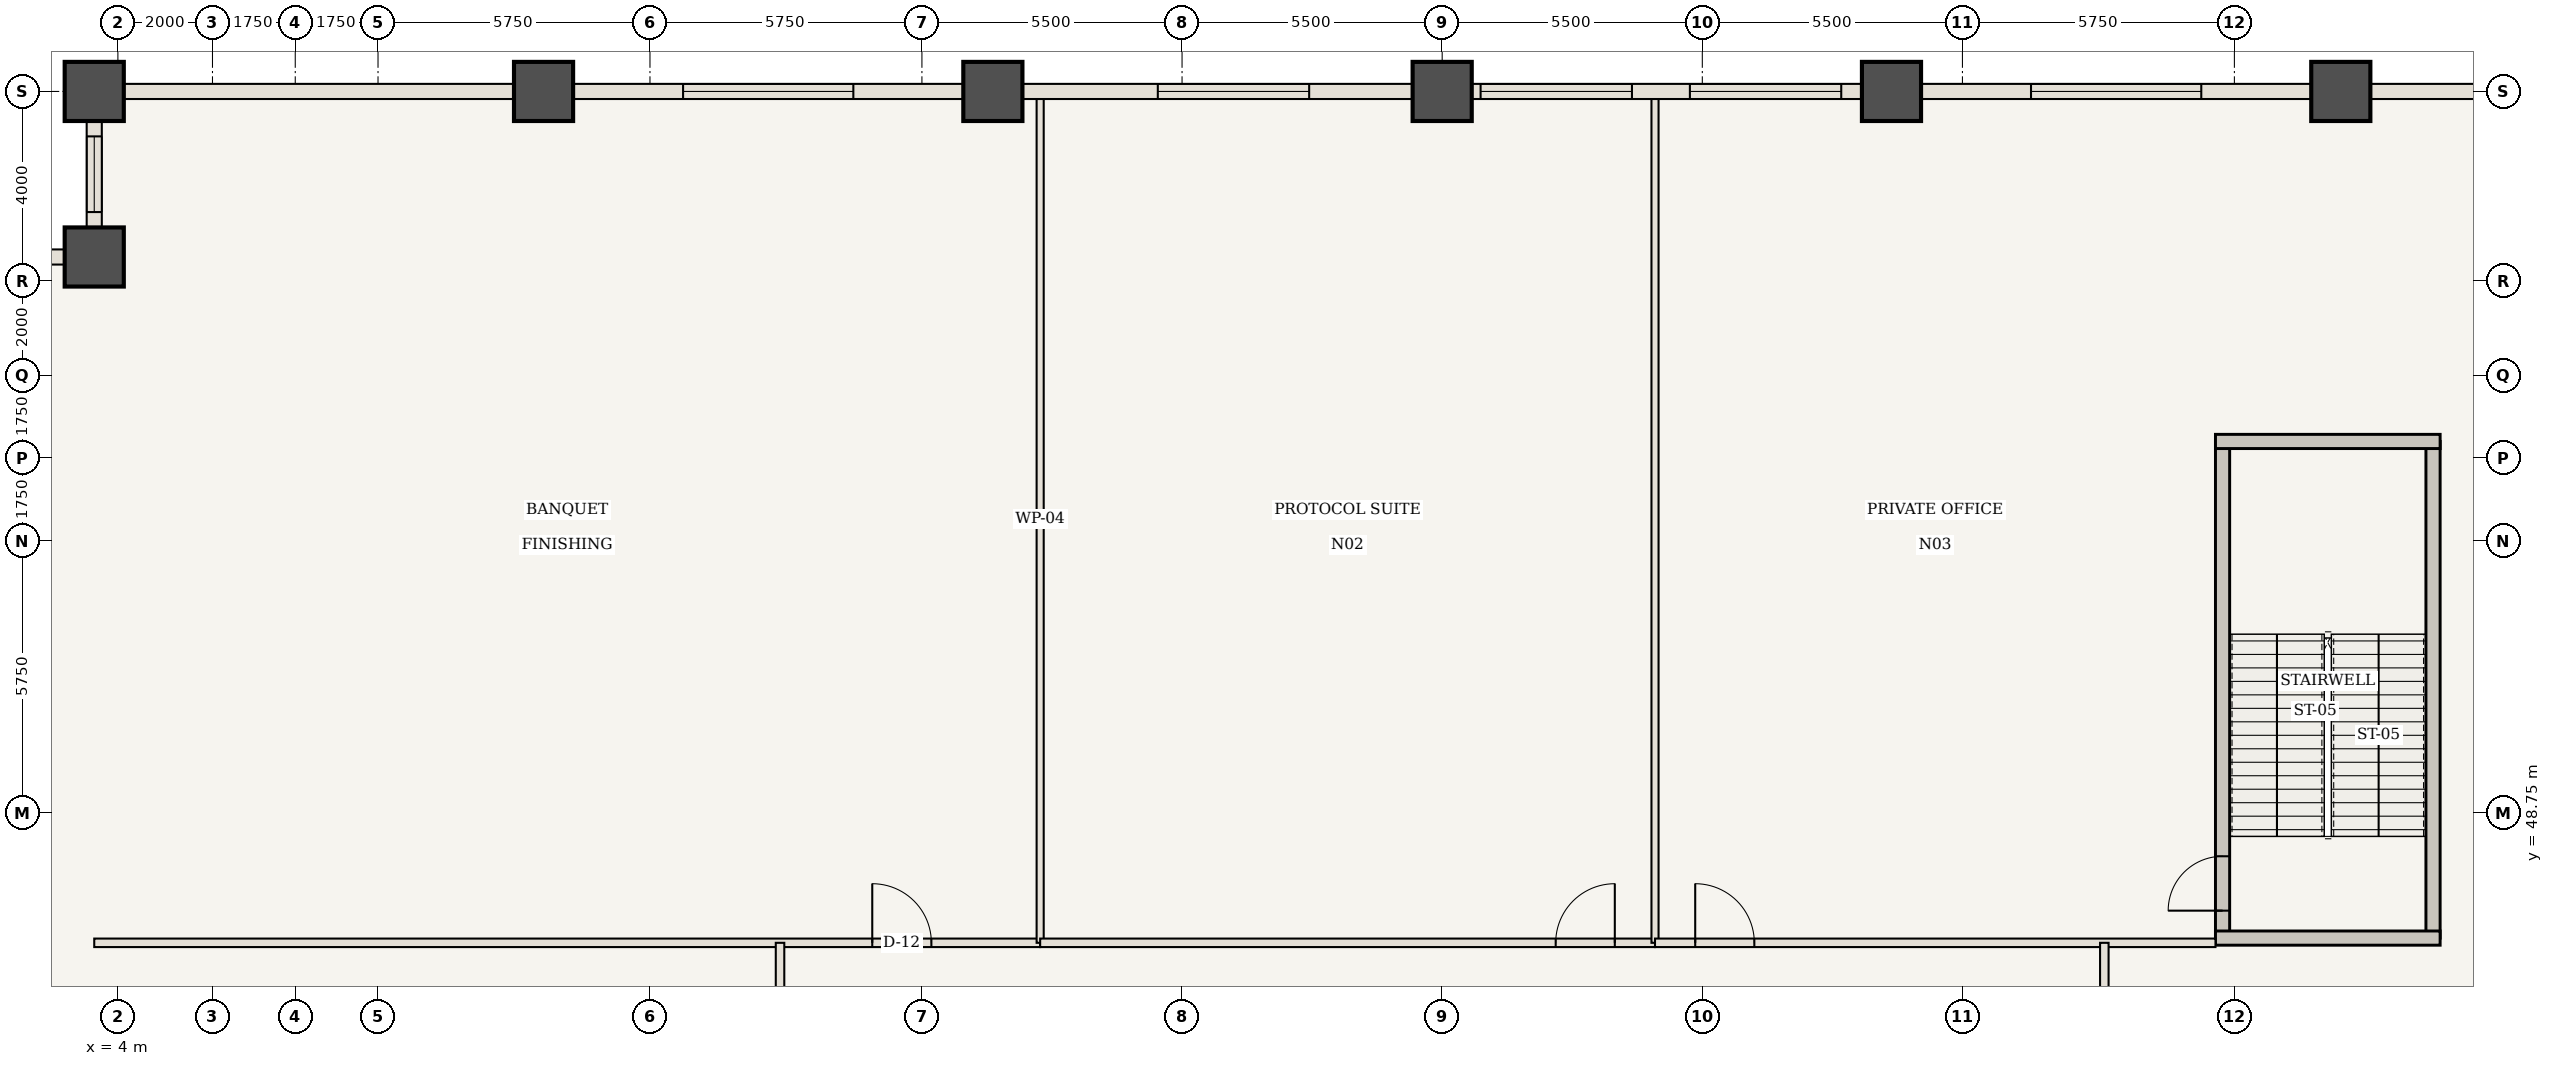
"""IFC4 building model, lengths in metres.
Left out: names, types, materials, properties, quantities, classifications, styles, units other than length and angle.
Written with IfcOpenShell. Run it as: python <this file> out.ifc"""

import sys

from ifc_helpers import new_model, si_unit, direction, frame, frame_2d, origin, origin_2d, place, context, subcontext, project, spatial, rectangle, extrude, element, fill, save


model = new_model("IFC4")
c1 = context("Model", 3, precision=1e-05, world=origin(), true_north=direction((0.0, 1.0)))
c2 = subcontext(c1, "Body", "Model", "MODEL_VIEW")
j1 = project(units=[si_unit("LENGTHUNIT", "METRE"), si_unit("PLANEANGLEUNIT", "RADIAN")], contexts=[c1])
p1 = place(None, origin())
s1 = spatial("IfcSite", under=j1, at=p1, CompositionType="ELEMENT")
p2 = place(p1, origin())
s2 = spatial("IfcBuilding", under=s1, at=p2, CompositionType="ELEMENT")
p3 = place(p2, frame((0.0, 0.0, 23.8)))
s3 = spatial("IfcBuildingStorey", under=s2, at=p3, CompositionType="ELEMENT", Elevation=23.8)
for number, where, z_axis, x_axis in (
    (1, (3.5, 64.0, 0.0), (0.0, 0.0, 1.0), (1.0, 0.0, 0.0)),
    (2, (3.5, 60.5, 0.0), (0.0, 0.0, 1.0), (1.0, 0.0, 0.0)),
    (3, (13.0, 64.0, 0.0), (0.0, 0.0, 1.0), (1.0, 0.0, 0.0)),
    (4, (22.5, 64.0, 0.0), (0.0, 0.0, 1.0), (1.0, 0.0, 0.0)),
    (5, (32.0, 64.0, 0.0), (0.0, 0.0, 1.0), (1.0, 0.0, 0.0)),
    (6, (41.5, 64.0, 0.0), (0.0, 0.0, 1.0), (1.0, 0.0, 0.0)),
    (7, (51.0, 64.0, 0.0), (0.0, 0.0, 1.0), (1.0, 0.0, 0.0)),
):
    element("IfcColumn", number, at=place(p3, frame(where, z_axis=z_axis, x_axis=x_axis)), inside=s3, PredefinedType="COLUMN", context=c2, shape_type="SweptSolid", body=[
        extrude(rectangle(XDim=1.25, YDim=1.25, at=origin_2d()), origin(), (0.0, 0.0, 1.0), 5.6),
    ])
p4 = place(p3, frame((48.5, 46.1, 0.0), z_axis=(0.0, 0.0, 1.0), x_axis=(0.0, 1.0, 0.0)))
e8 = element("IfcWall", 8, at=p4, inside=s3, PredefinedType="SHEAR", context=c2, shape_type="SweptSolid", body=[
    extrude(rectangle(XDim=10.5, YDim=0.3, at=frame_2d((5.25, 0.0))), origin(), (0.0, 0.0, 1.0), 5.18),
])
p5 = place(p4, frame((0.58, 0.0, 0.0)))
e9 = element("IfcOpeningElement", 9, at=p5, cuts=e8, PredefinedType="OPENING", context=c2, shape_type="SweptSolid", body=[
    extrude(rectangle(XDim=1.15, YDim=2.15, at=frame_2d((0.575, 1.075))), frame((0.0, 0.16, 0.0), z_axis=(0.0, -1.0, 0.0), x_axis=(1.0, 0.0, 0.0)), (0.0, 0.0, 1.0), 0.32),
])
p6 = place(p3, frame((52.95, 46.1, 0.0), z_axis=(0.0, 0.0, 1.0), x_axis=(0.0, 1.0, 0.0)))
e10 = element("IfcWall", 10, at=p6, inside=s3, PredefinedType="SHEAR", context=c2, shape_type="SweptSolid", body=[
    extrude(rectangle(XDim=10.5, YDim=0.3, at=frame_2d((5.25, 0.0))), origin(), (0.0, 0.0, 1.0), 5.18),
])
for number, where, z_axis, x_axis in (
    (11, (48.35, 46.1, 0.0), (0.0, 0.0, 1.0), (1.0, 0.0, 0.0)),
    (12, (48.35, 56.6, 0.0), (0.0, 0.0, 1.0), (1.0, 0.0, 0.0)),
):
    element("IfcWall", number, at=place(p3, frame(where, z_axis=z_axis, x_axis=x_axis)), inside=s3, PredefinedType="SHEAR", context=c2, shape_type="SweptSolid", body=[
        extrude(rectangle(XDim=4.75, YDim=0.3, at=frame_2d((2.375, 0.0))), origin(), (0.0, 0.0, 1.0), 5.18),
    ])
p7 = place(p3, frame((3.5, 46.0, 0.0), z_axis=(0.0, 0.0, 1.0), x_axis=(1.0, 0.0, 0.0)))
e13 = element("IfcWall", 13, at=p7, inside=s3, PredefinedType="STANDARD", context=c2, shape_type="SweptSolid", body=[
    extrude(rectangle(XDim=20.0, YDim=0.18, at=frame_2d((10.0, 0.0))), origin(), (0.0, 0.0, 1.0), 5.18),
])
p8 = place(p7, frame((16.45, 0.0, 0.0)))
e14 = element("IfcOpeningElement", 14, at=p8, cuts=e13, PredefinedType="OPENING", context=c2, shape_type="SweptSolid", body=[
    extrude(rectangle(XDim=1.25, YDim=2.2, at=frame_2d((0.625, 1.1))), frame((0.0, 0.1, 0.0), z_axis=(0.0, -1.0, 0.0), x_axis=(1.0, 0.0, 0.0)), (0.0, 0.0, 1.0), 0.2),
])
p9 = place(p3, frame((23.5, 46.0, 0.0), z_axis=(0.0, 0.0, 1.0), x_axis=(0.0, 1.0, 0.0)))
e15 = element("IfcWall", 15, at=p9, inside=s3, PredefinedType="STANDARD", context=c2, shape_type="SweptSolid", body=[
    extrude(rectangle(XDim=17.94, YDim=0.15, at=frame_2d((8.97, 0.0))), origin(), (0.0, 0.0, 1.0), 5.18),
])
p10 = place(p3, frame((23.5, 46.0, 0.0), z_axis=(0.0, 0.0, 1.0), x_axis=(1.0, 0.0, 0.0)))
e16 = element("IfcWall", 16, at=p10, inside=s3, PredefinedType="STANDARD", context=c2, shape_type="SweptSolid", body=[
    extrude(rectangle(XDim=13.0, YDim=0.18, at=frame_2d((6.5, 0.0))), origin(), (0.0, 0.0, 1.0), 5.18),
])
p11 = place(p10, frame((10.9, 0.0, 0.0)))
e17 = element("IfcOpeningElement", 17, at=p11, cuts=e16, PredefinedType="OPENING", context=c2, shape_type="SweptSolid", body=[
    extrude(rectangle(XDim=1.25, YDim=2.2, at=frame_2d((0.625, 1.1))), frame((0.0, 0.1, 0.0), z_axis=(0.0, -1.0, 0.0), x_axis=(1.0, 0.0, 0.0)), (0.0, 0.0, 1.0), 0.2),
])
p12 = place(p3, frame((36.5, 46.0, 0.0), z_axis=(0.0, 0.0, 1.0), x_axis=(0.0, 1.0, 0.0)))
e18 = element("IfcWall", 18, at=p12, inside=s3, PredefinedType="STANDARD", context=c2, shape_type="SweptSolid", body=[
    extrude(rectangle(XDim=17.94, YDim=0.15, at=frame_2d((8.97, 0.0))), origin(), (0.0, 0.0, 1.0), 5.18),
])
p13 = place(p3, frame((36.5, 46.0, 0.0), z_axis=(0.0, 0.0, 1.0), x_axis=(1.0, 0.0, 0.0)))
e19 = element("IfcWall", 19, at=p13, inside=s3, PredefinedType="STANDARD", context=c2, shape_type="SweptSolid", body=[
    extrude(rectangle(XDim=11.85, YDim=0.18, at=frame_2d((5.925, 0.0))), origin(), (0.0, 0.0, 1.0), 5.18),
])
p14 = place(p13, frame((0.85, 0.0, 0.0)))
e20 = element("IfcOpeningElement", 20, at=p14, cuts=e19, PredefinedType="OPENING", context=c2, shape_type="SweptSolid", body=[
    extrude(rectangle(XDim=1.25, YDim=2.2, at=frame_2d((0.625, 1.1))), frame((0.0, 0.1, 0.0), z_axis=(0.0, -1.0, 0.0), x_axis=(1.0, 0.0, 0.0)), (0.0, 0.0, 1.0), 0.2),
])
p15 = place(p3, frame((18.0, 31.2, 0.0), z_axis=(0.0, 0.0, 1.0), x_axis=(0.0, 1.0, 0.0)))
e21 = element("IfcWall", 21, at=p15, inside=s3, PredefinedType="STANDARD", context=c2, shape_type="SweptSolid", body=[
    extrude(rectangle(XDim=14.8, YDim=0.18, at=frame_2d((7.4, 0.0))), origin(), (0.0, 0.0, 1.0), 5.18),
])
p16 = place(p15, frame((6.9, 0.0, 0.0)))
e22 = element("IfcOpeningElement", 22, at=p16, cuts=e21, PredefinedType="OPENING", context=c2, shape_type="SweptSolid", body=[
    extrude(rectangle(XDim=0.95, YDim=2.15, at=frame_2d((0.475, 1.075))), frame((0.0, 0.1, 0.0), z_axis=(0.0, -1.0, 0.0), x_axis=(1.0, 0.0, 0.0)), (0.0, 0.0, 1.0), 0.2),
])
p17 = place(p3, frame((46.0, 32.8, 0.0), z_axis=(0.0, 0.0, 1.0), x_axis=(0.0, 1.0, 0.0)))
e23 = element("IfcWall", 23, at=p17, inside=s3, PredefinedType="STANDARD", context=c2, shape_type="SweptSolid", body=[
    extrude(rectangle(XDim=13.2, YDim=0.18, at=frame_2d((6.6, 0.0))), origin(), (0.0, 0.0, 1.0), 5.18),
])
p18 = place(p17, frame((6.1, 0.0, 0.0)))
e24 = element("IfcOpeningElement", 24, at=p18, cuts=e23, PredefinedType="OPENING", context=c2, shape_type="SweptSolid", body=[
    extrude(rectangle(XDim=0.95, YDim=2.15, at=frame_2d((0.475, 1.075))), frame((0.0, 0.1, 0.0), z_axis=(0.0, -1.0, 0.0), x_axis=(1.0, 0.0, 0.0)), (0.0, 0.0, 1.0), 0.2),
])
p19 = place(p3, frame((3.5, 64.0, 0.0), z_axis=(0.0, 0.0, 1.0), x_axis=(1.0, 0.0, 0.0)))
e25 = element("IfcWall", 25, at=p19, inside=s3, PredefinedType="USERDEFINED", context=c2, shape_type="SweptSolid", body=[
    extrude(rectangle(XDim=9.5, YDim=0.32, at=frame_2d((4.75, 0.0))), origin(), (0.0, 0.0, 1.0), 4.28),
])
p20 = place(p3, frame((13.0, 64.0, 0.0), z_axis=(0.0, 0.0, 1.0), x_axis=(1.0, 0.0, 0.0)))
e26 = element("IfcWall", 26, at=p20, inside=s3, PredefinedType="USERDEFINED", context=c2, shape_type="SweptSolid", body=[
    extrude(rectangle(XDim=9.5, YDim=0.32, at=frame_2d((4.75, 0.0))), origin(), (0.0, 0.0, 1.0), 4.28),
])
p21 = place(p20, frame((2.95, 0.0, 0.85)))
e27 = element("IfcOpeningElement", 27, at=p21, cuts=e26, PredefinedType="OPENING", context=c2, shape_type="SweptSolid", body=[
    extrude(rectangle(XDim=3.6, YDim=2.6, at=frame_2d((1.8, 1.3))), frame((0.0, 0.17, 0.0), z_axis=(0.0, -1.0, 0.0), x_axis=(1.0, 0.0, 0.0)), (0.0, 0.0, 1.0), 0.34),
])
p22 = place(p3, frame((22.5, 64.0, 0.0), z_axis=(0.0, 0.0, 1.0), x_axis=(1.0, 0.0, 0.0)))
e28 = element("IfcWall", 28, at=p22, inside=s3, PredefinedType="USERDEFINED", context=c2, shape_type="SweptSolid", body=[
    extrude(rectangle(XDim=9.5, YDim=0.32, at=frame_2d((4.75, 0.0))), origin(), (0.0, 0.0, 1.0), 4.28),
])
p23 = place(p22, frame((3.488, 0.0, 0.85)))
e29 = element("IfcOpeningElement", 29, at=p23, cuts=e28, PredefinedType="OPENING", context=c2, shape_type="SweptSolid", body=[
    extrude(rectangle(XDim=3.2, YDim=2.4, at=frame_2d((1.6, 1.2))), frame((0.0, 0.17, 0.0), z_axis=(0.0, -1.0, 0.0), x_axis=(1.0, 0.0, 0.0)), (0.0, 0.0, 1.0), 0.34),
])
p24 = place(p3, frame((32.0, 64.0, 0.0), z_axis=(0.0, 0.0, 1.0), x_axis=(1.0, 0.0, 0.0)))
e30 = element("IfcWall", 30, at=p24, inside=s3, PredefinedType="USERDEFINED", context=c2, shape_type="SweptSolid", body=[
    extrude(rectangle(XDim=9.5, YDim=0.32, at=frame_2d((4.75, 0.0))), origin(), (0.0, 0.0, 1.0), 4.28),
])
p25 = place(p24, frame((0.812, 0.0, 0.85)))
e31 = element("IfcOpeningElement", 31, at=p25, cuts=e30, PredefinedType="OPENING", context=c2, shape_type="SweptSolid", body=[
    extrude(rectangle(XDim=3.2, YDim=2.4, at=frame_2d((1.6, 1.2))), frame((0.0, 0.17, 0.0), z_axis=(0.0, -1.0, 0.0), x_axis=(1.0, 0.0, 0.0)), (0.0, 0.0, 1.0), 0.34),
])
p26 = place(p24, frame((5.238, 0.0, 0.85)))
e32 = element("IfcOpeningElement", 32, at=p26, cuts=e30, PredefinedType="OPENING", context=c2, shape_type="SweptSolid", body=[
    extrude(rectangle(XDim=3.2, YDim=2.4, at=frame_2d((1.6, 1.2))), frame((0.0, 0.17, 0.0), z_axis=(0.0, -1.0, 0.0), x_axis=(1.0, 0.0, 0.0)), (0.0, 0.0, 1.0), 0.34),
])
p27 = place(p3, frame((41.5, 64.0, 0.0), z_axis=(0.0, 0.0, 1.0), x_axis=(1.0, 0.0, 0.0)))
e33 = element("IfcWall", 33, at=p27, inside=s3, PredefinedType="USERDEFINED", context=c2, shape_type="SweptSolid", body=[
    extrude(rectangle(XDim=9.5, YDim=0.32, at=frame_2d((4.75, 0.0))), origin(), (0.0, 0.0, 1.0), 4.28),
])
p28 = place(p27, frame((2.95, 0.0, 0.85)))
e34 = element("IfcOpeningElement", 34, at=p28, cuts=e33, PredefinedType="OPENING", context=c2, shape_type="SweptSolid", body=[
    extrude(rectangle(XDim=3.6, YDim=2.6, at=frame_2d((1.8, 1.3))), frame((0.0, 0.17, 0.0), z_axis=(0.0, -1.0, 0.0), x_axis=(1.0, 0.0, 0.0)), (0.0, 0.0, 1.0), 0.34),
])
p29 = place(p3, frame((51.0, 64.0, 0.0), z_axis=(0.0, 0.0, 1.0), x_axis=(1.0, 0.0, 0.0)))
e35 = element("IfcWall", 35, at=p29, inside=s3, PredefinedType="USERDEFINED", context=c2, shape_type="SweptSolid", body=[
    extrude(rectangle(XDim=9.5, YDim=0.32, at=frame_2d((4.75, 0.0))), origin(), (0.0, 0.0, 1.0), 4.28),
])
p30 = place(p3, frame((3.5, 60.5, 0.0), z_axis=(0.0, 0.0, 1.0), x_axis=(0.0, 1.0, 0.0)))
e36 = element("IfcWall", 36, at=p30, inside=s3, PredefinedType="USERDEFINED", context=c2, shape_type="SweptSolid", body=[
    extrude(rectangle(XDim=3.5, YDim=0.32, at=frame_2d((1.75, 0.0))), origin(), (0.0, 0.0, 1.0), 4.28),
])
p31 = place(p30, frame((0.95, 0.0, 0.85)))
e37 = element("IfcOpeningElement", 37, at=p31, cuts=e36, PredefinedType="OPENING", context=c2, shape_type="SweptSolid", body=[
    extrude(rectangle(XDim=1.6, YDim=2.05, at=frame_2d((0.8, 1.025))), frame((0.0, 0.17, 0.0), z_axis=(0.0, -1.0, 0.0), x_axis=(1.0, 0.0, 0.0)), (0.0, 0.0, 1.0), 0.34),
])
p32 = place(p3, frame((0.0, 60.5, 0.0), z_axis=(0.0, 0.0, 1.0), x_axis=(1.0, 0.0, 0.0)))
e38 = element("IfcWall", 38, at=p32, inside=s3, PredefinedType="USERDEFINED", context=c2, shape_type="SweptSolid", body=[
    extrude(rectangle(XDim=3.5, YDim=0.32, at=frame_2d((1.75, 0.0))), origin(), (0.0, 0.0, 1.0), 4.28),
])
p33 = place(p32, frame((0.95, 0.0, 0.85)))
e39 = element("IfcOpeningElement", 39, at=p33, cuts=e38, PredefinedType="OPENING", context=c2, shape_type="SweptSolid", body=[
    extrude(rectangle(XDim=1.6, YDim=2.05, at=frame_2d((0.8, 1.025))), frame((0.0, 0.17, 0.0), z_axis=(0.0, -1.0, 0.0), x_axis=(1.0, 0.0, 0.0)), (0.0, 0.0, 1.0), 0.34),
])
p34 = place(p5, origin())
e40 = element("IfcDoor", 40, at=p34, inside=s3, OperationType="SINGLE_SWING_LEFT", PredefinedType="DOOR", context=c2, shape_type="SweptSolid", body=[
    extrude(rectangle(XDim=1.15, YDim=2.15, at=frame_2d((0.575, 1.075))), frame((0.0, 0.025, 0.0), z_axis=(0.0, -1.0, 0.0), x_axis=(1.0, 0.0, 0.0)), (0.0, 0.0, 1.0), 0.05),
])
fill(e9, e40)
p35 = place(p8, origin())
e41 = element("IfcDoor", 41, at=p35, inside=s3, OperationType="SINGLE_SWING_LEFT", PredefinedType="DOOR", context=c2, shape_type="SweptSolid", body=[
    extrude(rectangle(XDim=1.25, YDim=2.2, at=frame_2d((0.625, 1.1))), frame((0.0, 0.025, 0.0), z_axis=(0.0, -1.0, 0.0), x_axis=(1.0, 0.0, 0.0)), (0.0, 0.0, 1.0), 0.05),
])
fill(e14, e41)
p36 = place(p11, origin())
e42 = element("IfcDoor", 42, at=p36, inside=s3, OperationType="SINGLE_SWING_RIGHT", PredefinedType="DOOR", context=c2, shape_type="SweptSolid", body=[
    extrude(rectangle(XDim=1.25, YDim=2.2, at=frame_2d((0.625, 1.1))), frame((0.0, 0.025, 0.0), z_axis=(0.0, -1.0, 0.0), x_axis=(1.0, 0.0, 0.0)), (0.0, 0.0, 1.0), 0.05),
])
fill(e17, e42)
p37 = place(p14, origin())
e43 = element("IfcDoor", 43, at=p37, inside=s3, OperationType="SINGLE_SWING_LEFT", PredefinedType="DOOR", context=c2, shape_type="SweptSolid", body=[
    extrude(rectangle(XDim=1.25, YDim=2.2, at=frame_2d((0.625, 1.1))), frame((0.0, 0.025, 0.0), z_axis=(0.0, -1.0, 0.0), x_axis=(1.0, 0.0, 0.0)), (0.0, 0.0, 1.0), 0.05),
])
fill(e20, e43)
p38 = place(p21, origin())
e44 = element("IfcWindow", 44, at=p38, inside=s3, PartitioningType="SINGLE_PANEL", PredefinedType="WINDOW", context=c2, shape_type="SweptSolid", body=[
    extrude(rectangle(XDim=3.6, YDim=2.6, at=frame_2d((1.8, 1.3))), frame((0.0, 0.03, 0.0), z_axis=(0.0, -1.0, 0.0), x_axis=(1.0, 0.0, 0.0)), (0.0, 0.0, 1.0), 0.06),
])
fill(e27, e44)
p39 = place(p23, origin())
e45 = element("IfcWindow", 45, at=p39, inside=s3, PartitioningType="SINGLE_PANEL", PredefinedType="WINDOW", context=c2, shape_type="SweptSolid", body=[
    extrude(rectangle(XDim=3.2, YDim=2.4, at=frame_2d((1.6, 1.2))), frame((0.0, 0.03, 0.0), z_axis=(0.0, -1.0, 0.0), x_axis=(1.0, 0.0, 0.0)), (0.0, 0.0, 1.0), 0.06),
])
fill(e29, e45)
p40 = place(p25, origin())
e46 = element("IfcWindow", 46, at=p40, inside=s3, PartitioningType="SINGLE_PANEL", PredefinedType="WINDOW", context=c2, shape_type="SweptSolid", body=[
    extrude(rectangle(XDim=3.2, YDim=2.4, at=frame_2d((1.6, 1.2))), frame((0.0, 0.03, 0.0), z_axis=(0.0, -1.0, 0.0), x_axis=(1.0, 0.0, 0.0)), (0.0, 0.0, 1.0), 0.06),
])
fill(e31, e46)
p41 = place(p26, origin())
e47 = element("IfcWindow", 47, at=p41, inside=s3, PartitioningType="SINGLE_PANEL", PredefinedType="WINDOW", context=c2, shape_type="SweptSolid", body=[
    extrude(rectangle(XDim=3.2, YDim=2.4, at=frame_2d((1.6, 1.2))), frame((0.0, 0.03, 0.0), z_axis=(0.0, -1.0, 0.0), x_axis=(1.0, 0.0, 0.0)), (0.0, 0.0, 1.0), 0.06),
])
fill(e32, e47)
p42 = place(p28, origin())
e48 = element("IfcWindow", 48, at=p42, inside=s3, PartitioningType="SINGLE_PANEL", PredefinedType="WINDOW", context=c2, shape_type="SweptSolid", body=[
    extrude(rectangle(XDim=3.6, YDim=2.6, at=frame_2d((1.8, 1.3))), frame((0.0, 0.03, 0.0), z_axis=(0.0, -1.0, 0.0), x_axis=(1.0, 0.0, 0.0)), (0.0, 0.0, 1.0), 0.06),
])
fill(e34, e48)
p43 = place(p31, origin())
e49 = element("IfcWindow", 49, at=p43, inside=s3, PartitioningType="SINGLE_PANEL", PredefinedType="WINDOW", context=c2, shape_type="SweptSolid", body=[
    extrude(rectangle(XDim=1.6, YDim=2.05, at=frame_2d((0.8, 1.025))), frame((0.0, 0.03, 0.0), z_axis=(0.0, -1.0, 0.0), x_axis=(1.0, 0.0, 0.0)), (0.0, 0.0, 1.0), 0.06),
])
fill(e37, e49)
save(model, sys.argv[1])
